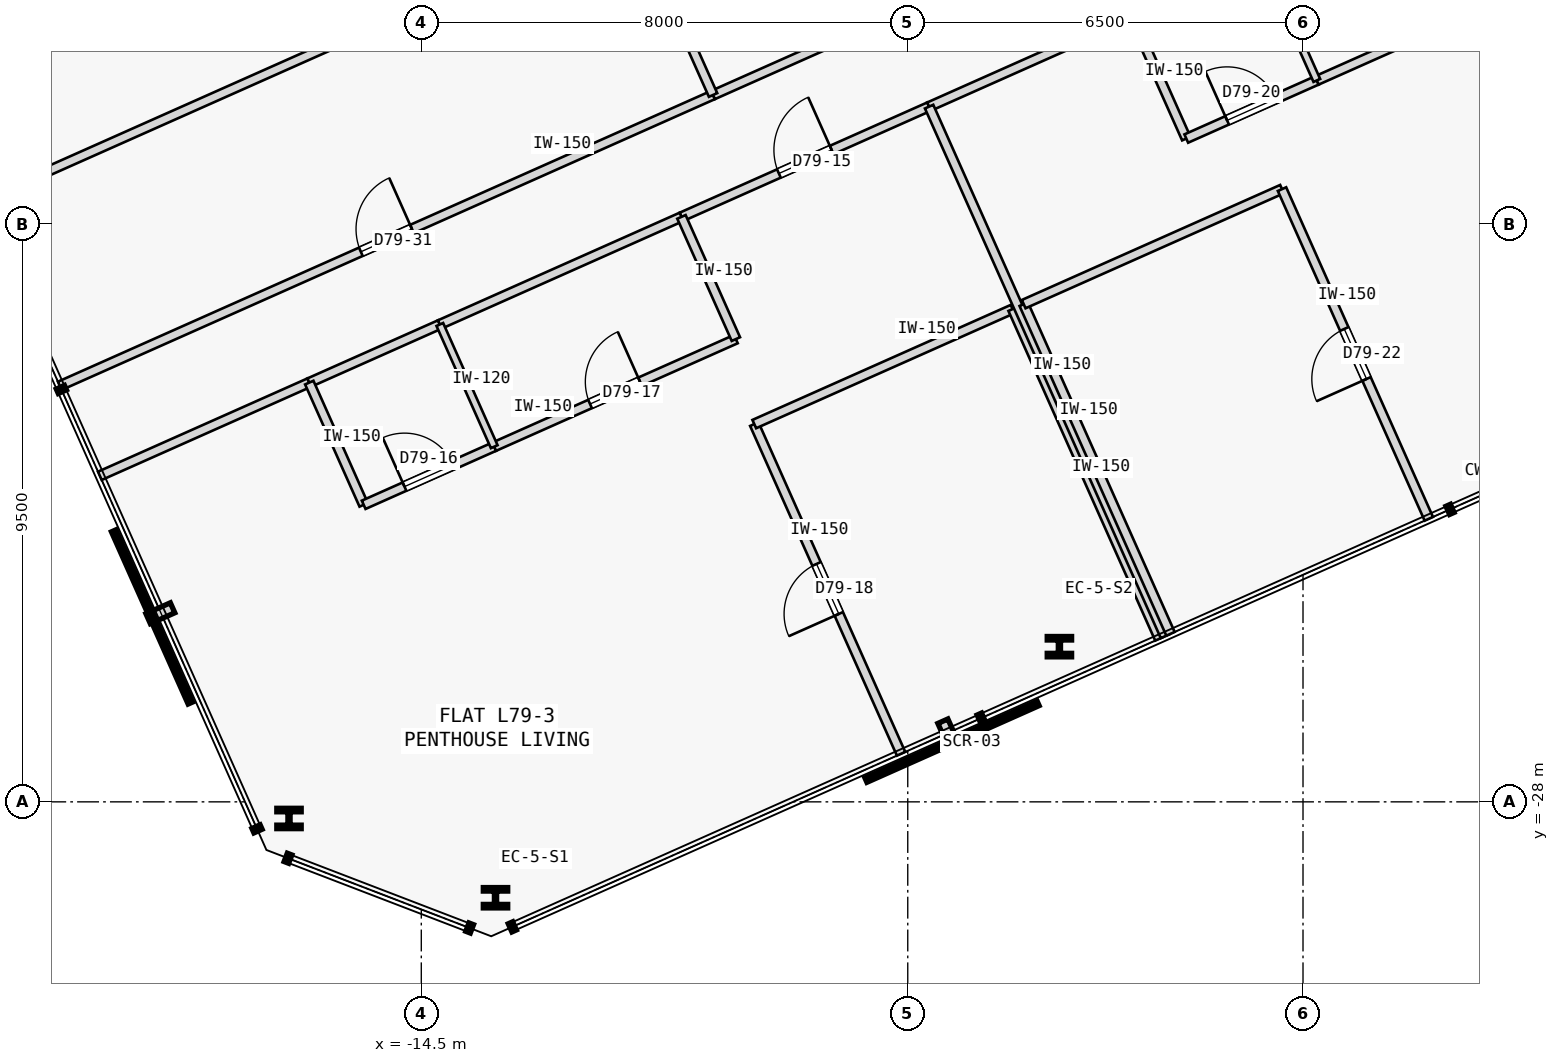
"""IFC4 building model, lengths in metres.
Left out: names, types, materials, properties, quantities, classifications, styles, units other than length and angle.
Written with IfcOpenShell. Run it as: python <this file> out.ifc"""

import sys

from ifc_helpers import new_model, si_unit, direction, frame, frame_2d, origin, origin_2d, place, context, subcontext, project, spatial, rectangle, i_section, extrude, element, fill, save


model = new_model("IFC4")
c1 = context("Model", 3, precision=1e-05, world=origin(), true_north=direction((0.0, 1.0)))
c2 = subcontext(c1, "Body", "Model", "MODEL_VIEW")
j1 = project(units=[si_unit("LENGTHUNIT", "METRE"), si_unit("PLANEANGLEUNIT", "RADIAN")], contexts=[c1])
p1 = place(None, origin())
s1 = spatial("IfcSite", under=j1, at=p1, CompositionType="ELEMENT")
p2 = place(p1, origin())
s2 = spatial("IfcBuilding", under=s1, at=p2, CompositionType="ELEMENT")
p3 = place(p2, frame((0.0, 0.0, 295.3)))
s3 = spatial("IfcBuildingStorey", under=s2, at=p3, CompositionType="ELEMENT", Elevation=295.3)
for number, where, z_axis, x_axis in (
    (1, (-13.28, -29.577, 0.0), (0.0, 0.0, 1.0), (1.0, 0.0, 0.0)),
    (2, (-4.006, -25.448, 0.0), (0.0, 0.0, 1.0), (1.0, 0.0, 0.0)),
    (3, (-16.676, -28.273, 0.0), (0.0, 0.0, 1.0), (1.0, 0.0, 0.0)),
):
    element("IfcColumn", number, at=place(p3, frame(where, z_axis=z_axis, x_axis=x_axis)), inside=s3, PredefinedType="COLUMN", context=c2, shape_type="SweptSolid", body=[
        extrude(i_section(OverallWidth=0.401, OverallDepth=0.335, WebThickness=0.036, FlangeThickness=0.058, FilletRadius=0.015, at=origin_2d()), origin(), (0.0, 0.0, 1.0), 3.35),
    ])
p4 = place(p3, frame((-19.786, -22.639, 0.0), z_axis=(0.0, 0.0, 1.0), x_axis=(0.913541633228, 0.406745232743, 0.0)))
e4 = element("IfcWall", 4, at=p4, inside=s3, PredefinedType="PARTITIONING", context=c2, shape_type="SweptSolid", body=[
    extrude(rectangle(XDim=3.77, YDim=0.15, at=frame_2d((1.885, 0.0))), origin(), (0.0, 0.0, 1.0), 3.125),
])
p5 = place(p3, frame((-10.221, -18.38, 0.0), z_axis=(0.0, 0.0, 1.0), x_axis=(0.913542602601, 0.406743055543, 0.0)))
e5 = element("IfcWall", 5, at=p5, inside=s3, PredefinedType="PARTITIONING", context=c2, shape_type="SweptSolid", body=[
    extrude(rectangle(XDim=4.458, YDim=0.15, at=frame_2d((2.229, 0.0))), origin(), (0.0, 0.0, 1.0), 3.125),
])
p6 = place(p5, frame((1.754, 0.0, 0.0)))
e6 = element("IfcOpeningElement", 6, at=p6, cuts=e5, PredefinedType="OPENING", context=c2, shape_type="SweptSolid", body=[
    extrude(rectangle(XDim=0.95, YDim=2.15, at=frame_2d((0.475, 1.075))), frame((0.0, 0.085, 0.0), z_axis=(0.0, -1.0, 0.0), x_axis=(1.0, 0.0, 0.0)), (0.0, 0.0, 1.0), 0.17),
])
p7 = place(p3, frame((-16.342, -21.105, 0.0), z_axis=(0.0, 0.0, 1.0), x_axis=(0.913558622212, 0.406707073682, 0.0)))
e7 = element("IfcWall", 7, at=p7, inside=s3, PredefinedType="PARTITIONING", context=c2, shape_type="SweptSolid", body=[
    extrude(rectangle(XDim=2.35, YDim=0.15, at=frame_2d((1.175, 0.0))), origin(), (0.0, 0.0, 1.0), 3.125),
])
p8 = place(p3, frame((-14.195, -20.149, 0.0), z_axis=(0.0, 0.0, 1.0), x_axis=(0.913545193015, 0.406737237438, 0.0)))
e8 = element("IfcWall", 8, at=p8, inside=s3, PredefinedType="PARTITIONING", context=c2, shape_type="SweptSolid", body=[
    extrude(rectangle(XDim=4.35, YDim=0.15, at=frame_2d((2.175, 0.0))), origin(), (0.0, 0.0, 1.0), 3.125),
])
p9 = place(p3, frame((-6.149, -16.567, 0.0), z_axis=(0.0, 0.0, 1.0), x_axis=(0.913543802, 0.40674036169, 0.0)))
e9 = element("IfcWall", 9, at=p9, inside=s3, PredefinedType="PARTITIONING", context=c2, shape_type="SweptSolid", body=[
    extrude(rectangle(XDim=3.65, YDim=0.15, at=frame_2d((1.825, 0.0))), origin(), (0.0, 0.0, 1.0), 3.125),
])
p10 = place(p3, frame((-20.445, -21.159, 0.0), z_axis=(0.0, 0.0, 1.0), x_axis=(0.913547681516, 0.406731648137, 0.0)))
e10 = element("IfcWall", 10, at=p10, inside=s3, PredefinedType="PARTITIONING", context=c2, shape_type="SweptSolid", body=[
    extrude(rectangle(XDim=11.76, YDim=0.15, at=frame_2d((5.88, 0.0))), origin(), (0.0, 0.0, 1.0), 3.125),
])
p11 = place(p10, frame((5.42, 0.0, 0.0)))
e11 = element("IfcOpeningElement", 11, at=p11, cuts=e10, PredefinedType="OPENING", context=c2, shape_type="SweptSolid", body=[
    extrude(rectangle(XDim=0.92, YDim=2.15, at=frame_2d((0.46, 1.075))), frame((0.0, 0.085, 0.0), z_axis=(0.0, -1.0, 0.0), x_axis=(1.0, 0.0, 0.0)), (0.0, 0.0, 1.0), 0.17),
])
p12 = place(p3, frame((-9.702, -16.375, 0.0), z_axis=(0.0, 0.0, 1.0), x_axis=(0.913552389019, 0.406721074594, 0.0)))
e12 = element("IfcWall", 12, at=p12, inside=s3, PredefinedType="PARTITIONING", context=c2, shape_type="SweptSolid", body=[
    extrude(rectangle(XDim=6.57, YDim=0.15, at=frame_2d((3.285, 0.0))), origin(), (0.0, 0.0, 1.0), 3.125),
])
p13 = place(p12, frame((2.825, 0.0, 0.0)))
e13 = element("IfcOpeningElement", 13, at=p13, cuts=e12, PredefinedType="OPENING", context=c2, shape_type="SweptSolid", body=[
    extrude(rectangle(XDim=0.92, YDim=2.15, at=frame_2d((0.46, 1.075))), frame((0.0, 0.085, 0.0), z_axis=(0.0, -1.0, 0.0), x_axis=(1.0, 0.0, 0.0)), (0.0, 0.0, 1.0), 0.17),
])
p14 = place(p3, frame((-15.448, -23.115, 0.0), z_axis=(0.0, 0.0, 1.0), x_axis=(-0.406725294076, 0.913550510459, 0.0)))
e14 = element("IfcWall", 14, at=p14, inside=s3, PredefinedType="PARTITIONING", context=c2, shape_type="SweptSolid", body=[
    extrude(rectangle(XDim=2.2, YDim=0.15, at=frame_2d((1.1, 0.0))), origin(), (0.0, 0.0, 1.0), 3.125),
])
p15 = place(p3, frame((-15.448, -23.115, 0.0), z_axis=(0.0, 0.0, 1.0), x_axis=(0.913558622212, 0.406707073682, 0.0)))
e15 = element("IfcWall", 15, at=p15, inside=s3, PredefinedType="PARTITIONING", context=c2, shape_type="SweptSolid", body=[
    extrude(rectangle(XDim=2.35, YDim=0.15, at=frame_2d((1.175, 0.0))), origin(), (0.0, 0.0, 1.0), 3.125),
])
p16 = place(p15, frame((0.735, 0.0, 0.0)))
e16 = element("IfcOpeningElement", 16, at=p16, cuts=e15, PredefinedType="OPENING", context=c2, shape_type="SweptSolid", body=[
    extrude(rectangle(XDim=0.88, YDim=2.15, at=frame_2d((0.44, 1.075))), frame((0.0, 0.085, 0.0), z_axis=(0.0, -1.0, 0.0), x_axis=(1.0, 0.0, 0.0)), (0.0, 0.0, 1.0), 0.17),
])
p17 = place(p3, frame((-13.301, -22.159, 0.0), z_axis=(0.0, 0.0, 1.0), x_axis=(0.913545193015, 0.406737237438, 0.0)))
e17 = element("IfcWall", 17, at=p17, inside=s3, PredefinedType="PARTITIONING", context=c2, shape_type="SweptSolid", body=[
    extrude(rectangle(XDim=4.35, YDim=0.15, at=frame_2d((2.175, 0.0))), origin(), (0.0, 0.0, 1.0), 3.125),
])
p18 = place(p17, frame((1.725, 0.0, 0.0)))
e18 = element("IfcOpeningElement", 18, at=p18, cuts=e17, PredefinedType="OPENING", context=c2, shape_type="SweptSolid", body=[
    extrude(rectangle(XDim=0.9, YDim=2.15, at=frame_2d((0.45, 1.075))), frame((0.0, 0.085, 0.0), z_axis=(0.0, -1.0, 0.0), x_axis=(1.0, 0.0, 0.0)), (0.0, 0.0, 1.0), 0.17),
])
p19 = place(p3, frame((-9.327, -20.39, 0.0), z_axis=(0.0, 0.0, 1.0), x_axis=(-0.406725294076, 0.913550510459, 0.0)))
e19 = element("IfcWall", 19, at=p19, inside=s3, PredefinedType="PARTITIONING", context=c2, shape_type="SweptSolid", body=[
    extrude(rectangle(XDim=2.2, YDim=0.15, at=frame_2d((1.1, 0.0))), origin(), (0.0, 0.0, 1.0), 3.125),
])
p20 = place(p3, frame((-6.61, -27.21, 0.0), z_axis=(0.0, 0.0, 1.0), x_axis=(-0.406699433793, 0.913562023375, 0.0)))
e20 = element("IfcWall", 20, at=p20, inside=s3, PredefinedType="PARTITIONING", context=c2, shape_type="SweptSolid", body=[
    extrude(rectangle(XDim=5.935, YDim=0.15, at=frame_2d((2.968, 0.0))), origin(), (0.0, 0.0, 1.0), 3.125),
])
p21 = place(p20, frame((2.518, 0.0, 0.0)))
e21 = element("IfcOpeningElement", 21, at=p21, cuts=e20, PredefinedType="OPENING", context=c2, shape_type="SweptSolid", body=[
    extrude(rectangle(XDim=0.9, YDim=2.15, at=frame_2d((0.45, 1.075))), frame((0.0, 0.085, 0.0), z_axis=(0.0, -1.0, 0.0), x_axis=(1.0, 0.0, 0.0)), (0.0, 0.0, 1.0), 0.17),
])
p22 = place(p3, frame((-9.024, -21.788, 0.0), z_axis=(0.0, 0.0, 1.0), x_axis=(0.913564558304, 0.406693739576, 0.0)))
e22 = element("IfcWall", 22, at=p22, inside=s3, PredefinedType="PARTITIONING", context=c2, shape_type="SweptSolid", body=[
    extrude(rectangle(XDim=4.65, YDim=0.15, at=frame_2d((2.325, 0.0))), origin(), (0.0, 0.0, 1.0), 3.125),
])
p23 = place(p3, frame((-2.362, -25.318, 0.0), z_axis=(0.0, 0.0, 1.0), x_axis=(-0.406714717734, 0.913555219119, 0.0)))
e23 = element("IfcWall", 23, at=p23, inside=s3, PredefinedType="PARTITIONING", context=c2, shape_type="SweptSolid", body=[
    extrude(rectangle(XDim=5.935, YDim=0.15, at=frame_2d((2.967, 0.0))), origin(), (0.0, 0.0, 1.0), 3.125),
])
p24 = place(p3, frame((-2.271, -25.278, 0.0), z_axis=(0.0, 0.0, 1.0), x_axis=(-0.406751296215, 0.913538933504, 0.0)))
e24 = element("IfcWall", 24, at=p24, inside=s3, PredefinedType="PARTITIONING", context=c2, shape_type="SweptSolid", body=[
    extrude(rectangle(XDim=9.535, YDim=0.15, at=frame_2d((4.768, 0.0))), origin(), (0.0, 0.0, 1.0), 3.125),
])
p25 = place(p3, frame((-13.301, -22.159, 0.0), z_axis=(0.0, 0.0, 1.0), x_axis=(-0.406725294076, 0.913550510459, 0.0)))
e25 = element("IfcWall", 25, at=p25, inside=s3, PredefinedType="PARTITIONING", context=c2, shape_type="SweptSolid", body=[
    extrude(rectangle(XDim=2.2, YDim=0.12, at=frame_2d((1.1, 0.0))), origin(), (0.0, 0.0, 1.0), 3.125),
])
p26 = place(p3, frame((-1.92, -17.092, 0.0), z_axis=(0.0, 0.0, 1.0), x_axis=(-0.406725294076, 0.913550510459, 0.0)))
e26 = element("IfcWall", 26, at=p26, inside=s3, PredefinedType="PARTITIONING", context=c2, shape_type="SweptSolid", body=[
    extrude(rectangle(XDim=2.2, YDim=0.15, at=frame_2d((1.1, 0.0))), origin(), (0.0, 0.0, 1.0), 3.125),
])
p27 = place(p3, frame((-1.92, -17.092, 0.0), z_axis=(0.0, 0.0, 1.0), x_axis=(0.913558622212, 0.406707073682, 0.0)))
e27 = element("IfcWall", 27, at=p27, inside=s3, PredefinedType="PARTITIONING", context=c2, shape_type="SweptSolid", body=[
    extrude(rectangle(XDim=2.35, YDim=0.15, at=frame_2d((1.175, 0.0))), origin(), (0.0, 0.0, 1.0), 3.125),
])
p28 = place(p27, frame((0.735, 0.0, 0.0)))
e28 = element("IfcOpeningElement", 28, at=p28, cuts=e27, PredefinedType="OPENING", context=c2, shape_type="SweptSolid", body=[
    extrude(rectangle(XDim=0.88, YDim=2.15, at=frame_2d((0.44, 1.075))), frame((0.0, 0.085, 0.0), z_axis=(0.0, -1.0, 0.0), x_axis=(1.0, 0.0, 0.0)), (0.0, 0.0, 1.0), 0.17),
])
p29 = place(p3, frame((0.227, -16.136, 0.0), z_axis=(0.0, 0.0, 1.0), x_axis=(0.913545193015, 0.406737237438, 0.0)))
e29 = element("IfcWall", 29, at=p29, inside=s3, PredefinedType="PARTITIONING", context=c2, shape_type="SweptSolid", body=[
    extrude(rectangle(XDim=4.35, YDim=0.15, at=frame_2d((2.175, 0.0))), origin(), (0.0, 0.0, 1.0), 3.125),
])
p30 = place(p29, frame((1.725, 0.0, 0.0)))
e30 = element("IfcOpeningElement", 30, at=p30, cuts=e29, PredefinedType="OPENING", context=c2, shape_type="SweptSolid", body=[
    extrude(rectangle(XDim=0.9, YDim=2.15, at=frame_2d((0.45, 1.075))), frame((0.0, 0.085, 0.0), z_axis=(0.0, -1.0, 0.0), x_axis=(1.0, 0.0, 0.0)), (0.0, 0.0, 1.0), 0.17),
])
p31 = place(p3, frame((-2.179, -25.237, 0.0), z_axis=(0.0, 0.0, 1.0), x_axis=(-0.406749048544, 0.913539934271, 0.0)))
e31 = element("IfcWall", 31, at=p31, inside=s3, PredefinedType="PARTITIONING", context=c2, shape_type="SweptSolid", body=[
    extrude(rectangle(XDim=5.935, YDim=0.15, at=frame_2d((2.968, 0.0))), origin(), (0.0, 0.0, 1.0), 3.125),
])
p32 = place(p3, frame((-4.593, -19.815, 0.0), z_axis=(0.0, 0.0, 1.0), x_axis=(0.91354505039, 0.40673755778, 0.0)))
e32 = element("IfcWall", 32, at=p32, inside=s3, PredefinedType="PARTITIONING", context=c2, shape_type="SweptSolid", body=[
    extrude(rectangle(XDim=4.65, YDim=0.15, at=frame_2d((2.325, 0.0))), origin(), (0.0, 0.0, 1.0), 3.125),
])
p33 = place(p3, frame((2.069, -23.346, 0.0), z_axis=(0.0, 0.0, 1.0), x_axis=(-0.406699433793, 0.913562023375, 0.0)))
e33 = element("IfcWall", 33, at=p33, inside=s3, PredefinedType="PARTITIONING", context=c2, shape_type="SweptSolid", body=[
    extrude(rectangle(XDim=5.935, YDim=0.15, at=frame_2d((2.968, 0.0))), origin(), (0.0, 0.0, 1.0), 3.125),
])
p34 = place(p33, frame((2.518, 0.0, 0.0)))
e34 = element("IfcOpeningElement", 34, at=p34, cuts=e33, PredefinedType="OPENING", context=c2, shape_type="SweptSolid", body=[
    extrude(rectangle(XDim=0.9, YDim=2.15, at=frame_2d((0.45, 1.075))), frame((0.0, 0.085, 0.0), z_axis=(0.0, -1.0, 0.0), x_axis=(1.0, 0.0, 0.0)), (0.0, 0.0, 1.0), 0.17),
])
p35 = place(p3, frame((0.227, -16.136, 0.0), z_axis=(0.0, 0.0, 1.0), x_axis=(-0.406725294076, 0.913550510459, 0.0)))
e35 = element("IfcWall", 35, at=p35, inside=s3, PredefinedType="PARTITIONING", context=c2, shape_type="SweptSolid", body=[
    extrude(rectangle(XDim=2.2, YDim=0.12, at=frame_2d((1.1, 0.0))), origin(), (0.0, 0.0, 1.0), 3.125),
])
p36 = place(p3, frame((-21.789, -18.14, 0.0), z_axis=(0.0, 0.0, 1.0), x_axis=(0.913544247064, 0.406739362069, 0.0)))
e36 = element("IfcWall", 36, at=p36, inside=s3, PredefinedType="PARTITIONING", context=c2, shape_type="SweptSolid", body=[
    extrude(rectangle(XDim=11.76, YDim=0.15, at=frame_2d((5.88, 0.0))), origin(), (0.0, 0.0, 1.0), 3.125),
])
p37 = place(p3, frame((-9.702, -16.375, 0.0), z_axis=(0.0, 0.0, 1.0), x_axis=(-0.406740252054, 0.913543850813, 0.0)))
e37 = element("IfcWall", 37, at=p37, inside=s3, PredefinedType="PARTITIONING", context=c2, shape_type="SweptSolid", body=[
    extrude(rectangle(XDim=1.769, YDim=0.15, at=frame_2d((0.884, 0.0))), origin(), (0.0, 0.0, 1.0), 3.125),
])
p38 = place(p6, origin())
e38 = element("IfcDoor", 38, at=p38, inside=s3, OperationType="SINGLE_SWING_RIGHT", PredefinedType="DOOR", context=c2, shape_type="SweptSolid", body=[
    extrude(rectangle(XDim=0.95, YDim=2.15, at=frame_2d((0.475, 1.075))), frame((0.0, 0.025, 0.0), z_axis=(0.0, -1.0, 0.0), x_axis=(1.0, 0.0, 0.0)), (0.0, 0.0, 1.0), 0.05),
])
fill(e6, e38)
p39 = place(p16, origin())
e39 = element("IfcDoor", 39, at=p39, inside=s3, OperationType="SINGLE_SWING_LEFT", PredefinedType="DOOR", context=c2, shape_type="SweptSolid", body=[
    extrude(rectangle(XDim=0.88, YDim=2.15, at=frame_2d((0.44, 1.075))), frame((0.0, 0.025, 0.0), z_axis=(0.0, -1.0, 0.0), x_axis=(1.0, 0.0, 0.0)), (0.0, 0.0, 1.0), 0.05),
])
fill(e16, e39)
p40 = place(p18, origin())
e40 = element("IfcDoor", 40, at=p40, inside=s3, OperationType="SINGLE_SWING_RIGHT", PredefinedType="DOOR", context=c2, shape_type="SweptSolid", body=[
    extrude(rectangle(XDim=0.9, YDim=2.15, at=frame_2d((0.45, 1.075))), frame((0.0, 0.025, 0.0), z_axis=(0.0, -1.0, 0.0), x_axis=(1.0, 0.0, 0.0)), (0.0, 0.0, 1.0), 0.05),
])
fill(e18, e40)
p41 = place(p21, origin())
e41 = element("IfcDoor", 41, at=p41, inside=s3, OperationType="SINGLE_SWING_LEFT", PredefinedType="DOOR", context=c2, shape_type="SweptSolid", body=[
    extrude(rectangle(XDim=0.9, YDim=2.15, at=frame_2d((0.45, 1.075))), frame((0.0, 0.025, 0.0), z_axis=(0.0, -1.0, 0.0), x_axis=(1.0, 0.0, 0.0)), (0.0, 0.0, 1.0), 0.05),
])
fill(e21, e41)
p42 = place(p28, origin())
e42 = element("IfcDoor", 42, at=p42, inside=s3, OperationType="SINGLE_SWING_LEFT", PredefinedType="DOOR", context=c2, shape_type="SweptSolid", body=[
    extrude(rectangle(XDim=0.88, YDim=2.15, at=frame_2d((0.44, 1.075))), frame((0.0, 0.025, 0.0), z_axis=(0.0, -1.0, 0.0), x_axis=(1.0, 0.0, 0.0)), (0.0, 0.0, 1.0), 0.05),
])
fill(e28, e42)
p43 = place(p34, origin())
e43 = element("IfcDoor", 43, at=p43, inside=s3, OperationType="SINGLE_SWING_LEFT", PredefinedType="DOOR", context=c2, shape_type="SweptSolid", body=[
    extrude(rectangle(XDim=0.9, YDim=2.15, at=frame_2d((0.45, 1.075))), frame((0.0, 0.025, 0.0), z_axis=(0.0, -1.0, 0.0), x_axis=(1.0, 0.0, 0.0)), (0.0, 0.0, 1.0), 0.05),
])
fill(e34, e43)
p44 = place(p11, origin())
e44 = element("IfcDoor", 44, at=p44, inside=s3, OperationType="SINGLE_SWING_RIGHT", PredefinedType="DOOR", context=c2, shape_type="SweptSolid", body=[
    extrude(rectangle(XDim=0.92, YDim=2.15, at=frame_2d((0.46, 1.075))), frame((0.0, 0.025, 0.0), z_axis=(0.0, -1.0, 0.0), x_axis=(1.0, 0.0, 0.0)), (0.0, 0.0, 1.0), 0.05),
])
fill(e11, e44)
save(model, sys.argv[1])
